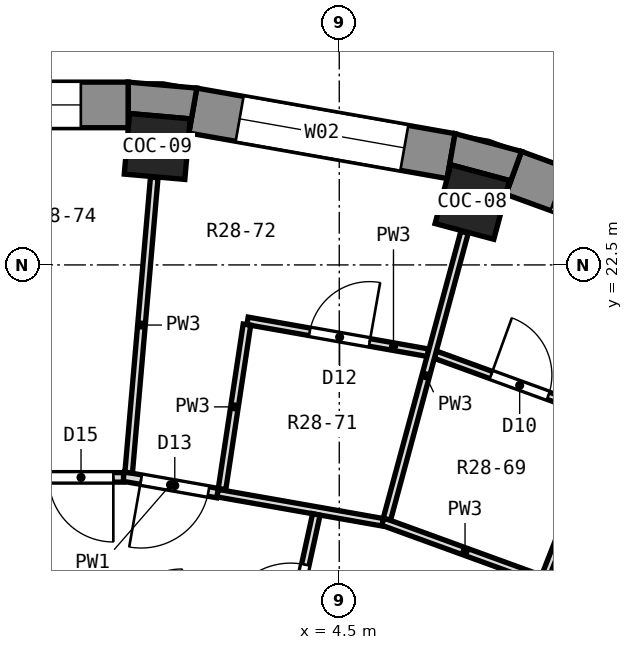
"""IFC4 building model, lengths in metres.
Left out: names, types, materials, properties, quantities, classifications, styles, units other than length and angle.
Written with IfcOpenShell. Run it as: python <this file> out.ifc"""

import sys

from ifc_helpers import new_model, si_unit, direction, frame, frame_2d, origin, origin_2d, place, context, subcontext, project, spatial, polyline, rectangle, outline, extrude, element, fill, save


model = new_model("IFC4")
c1 = context("Model", 3, precision=1e-05, world=origin(), true_north=direction((0.0, 1.0)))
c2 = subcontext(c1, "Body", "Model", "MODEL_VIEW")
j1 = project(units=[si_unit("LENGTHUNIT", "METRE"), si_unit("PLANEANGLEUNIT", "RADIAN")], contexts=[c1])
p1 = place(None, origin())
s1 = spatial("IfcSite", under=j1, at=p1, CompositionType="ELEMENT")
p2 = place(p1, origin())
s2 = spatial("IfcBuilding", under=s1, at=p2, CompositionType="ELEMENT")
p3 = place(p2, frame((0.0, 0.0, 190.5)))
s3 = spatial("IfcBuildingStorey", under=s2, at=p3, CompositionType="ELEMENT", Elevation=190.5)
for number, where, z_axis, x_axis in (
    (1, (6.25, 23.327, 0.0), (0.0, 0.0, 1.0), (0.259, 0.966, 0.0)),
    (2, (2.105, 24.058, 0.0), (0.0, 0.0, 1.0), (0.087, 0.996, 0.0)),
):
    element("IfcColumn", number, at=place(p3, frame(where, z_axis=z_axis, x_axis=x_axis)), inside=s3, PredefinedType="COLUMN", context=c2, shape_type="SweptSolid", body=[
        extrude(rectangle(XDim=0.8, YDim=0.8, at=origin_2d()), origin(), (0.0, 0.0, 1.0), 3.3),
    ])
p4 = place(p3, frame((10.036, 22.531, 0.0), z_axis=(0.0, 0.0, 1.0), x_axis=(-0.93968799822, 0.342032843455, 0.0)))
e3 = element("IfcWall", 3, at=p4, inside=s3, PredefinedType="SOLIDWALL", context=c2, shape_type="SweptSolid", body=[
    extrude(rectangle(XDim=3.45, YDim=0.6, at=frame_2d((1.725, 0.0))), origin(), (0.0, 0.0, 1.0), 2.85),
])
p5 = place(p4, frame((0.625, 0.0, 0.9)))
e4 = element("IfcOpeningElement", 4, at=p5, cuts=e3, PredefinedType="OPENING", context=c2, shape_type="SweptSolid", body=[
    extrude(rectangle(XDim=2.2, YDim=1.8, at=frame_2d((1.1, 0.9))), frame((0.0, 0.312, 0.0), z_axis=(0.0, -1.0, 0.0), x_axis=(1.0, 0.0, 0.0)), (0.0, 0.0, 1.0), 0.624),
])
p6 = place(p3, frame((5.971, 23.932, 0.0), z_axis=(0.0, 0.0, 1.0), x_axis=(-0.984814892183, 0.173607684551, 0.0)))
e5 = element("IfcWall", 5, at=p6, inside=s3, PredefinedType="SOLIDWALL", context=c2, shape_type="SweptSolid", body=[
    extrude(rectangle(XDim=3.45, YDim=0.6, at=frame_2d((1.725, 0.0))), origin(), (0.0, 0.0, 1.0), 2.85),
])
p7 = place(p6, frame((0.625, 0.0, 0.9)))
e6 = element("IfcOpeningElement", 6, at=p7, cuts=e5, PredefinedType="OPENING", context=c2, shape_type="SweptSolid", body=[
    extrude(rectangle(XDim=2.2, YDim=1.8, at=frame_2d((1.1, 0.9))), frame((0.0, 0.312, 0.0), z_axis=(0.0, -1.0, 0.0), x_axis=(1.0, 0.0, 0.0)), (0.0, 0.0, 1.0), 0.624),
])
p8 = place(p3, frame((1.725, 24.605, 0.0), z_axis=(0.0, 0.0, 1.0), x_axis=(-1.0, 0.0, 0.0)))
e7 = element("IfcWall", 7, at=p8, inside=s3, PredefinedType="SOLIDWALL", context=c2, shape_type="SweptSolid", body=[
    extrude(rectangle(XDim=3.45, YDim=0.6, at=frame_2d((1.725, 0.0))), origin(), (0.0, 0.0, 1.0), 2.85),
])
p9 = place(p8, frame((0.625, 0.0, 0.9)))
e8 = element("IfcOpeningElement", 8, at=p9, cuts=e7, PredefinedType="OPENING", context=c2, shape_type="SweptSolid", body=[
    extrude(rectangle(XDim=2.2, YDim=1.8, at=frame_2d((1.1, 0.9))), frame((0.0, 0.312, 0.0), z_axis=(0.0, -1.0, 0.0), x_axis=(1.0, 0.0, 0.0)), (0.0, 0.0, 1.0), 0.624),
])
p10 = place(p3, origin())
e9 = element("IfcWall", 9, at=p10, inside=s3, PredefinedType="SOLIDWALL", context=c2, shape_type="SweptSolid", body=[
    extrude(outline(polyline([(6.023, 24.227), (5.919, 23.636), (5.968, 23.817), (6.74, 23.61), (6.692, 23.429), (6.897, 23.993), (6.023, 24.227)])), origin(), (0.0, 0.0, 1.0), 2.85),
])
p11 = place(p3, origin())
e10 = element("IfcWall", 10, at=p11, inside=s3, PredefinedType="SOLIDWALL", context=c2, shape_type="SweptSolid", body=[
    extrude(outline(polyline([(2.626, 24.826), (1.725, 24.905), (1.725, 24.305), (1.741, 24.491), (2.538, 24.422), (2.522, 24.235), (2.626, 24.826)])), origin(), (0.0, 0.0, 1.0), 2.85),
])
p12 = place(p3, frame((5.071, 19.123, 0.0), z_axis=(0.0, 0.0, 1.0), x_axis=(0.939734670151, -0.34190459154, 0.0)))
e11 = element("IfcWall", 11, at=p12, inside=s3, PredefinedType="PARTITIONING", context=c2, shape_type="SweptSolid", body=[
    extrude(rectangle(XDim=2.306, YDim=0.1, at=frame_2d((1.153, 0.0))), origin(), (0.0, 0.0, 1.0), 2.85),
])
p13 = place(p3, frame((5.764, 21.319, 0.0), z_axis=(0.0, 0.0, 1.0), x_axis=(0.939672176826, -0.342076307422, 0.0)))
e12 = element("IfcWall", 12, at=p13, inside=s3, PredefinedType="PARTITIONING", context=c2, shape_type="SweptSolid", body=[
    extrude(rectangle(XDim=2.412, YDim=0.1, at=frame_2d((1.206, 0.0))), origin(), (0.0, 0.0, 1.0), 2.85),
])
p14 = place(p13, frame((0.781, 0.0, 0.0)))
e13 = element("IfcOpeningElement", 13, at=p14, cuts=e12, PredefinedType="OPENING", context=c2, shape_type="SweptSolid", body=[
    extrude(rectangle(XDim=0.8, YDim=2.1, at=frame_2d((0.4, 1.05))), frame((0.0, 0.062, 0.0), z_axis=(0.0, -1.0, 0.0), x_axis=(1.0, 0.0, 0.0)), (0.0, 0.0, 1.0), 0.124),
])
p15 = place(p3, frame((2.899, 19.498, 0.0), z_axis=(0.0, 0.0, 1.0), x_axis=(0.984790246942, -0.173747430277, 0.0)))
e14 = element("IfcWall", 14, at=p15, inside=s3, PredefinedType="PARTITIONING", context=c2, shape_type="SweptSolid", body=[
    extrude(rectangle(XDim=2.205, YDim=0.1, at=frame_2d((1.102, 0.0))), origin(), (0.0, 0.0, 1.0), 2.85),
])
p16 = place(p3, frame((1.662, 19.716, 0.0), z_axis=(0.0, 0.0, 1.0), x_axis=(0.984789427994, -0.173752071961, 0.0)))
e15 = element("IfcWall", 15, at=p16, inside=s3, PredefinedType="PARTITIONING", context=c2, shape_type="SweptSolid", body=[
    extrude(rectangle(XDim=1.256, YDim=0.125, at=frame_2d((0.628, 0.0))), origin(), (0.0, 0.0, 1.0), 2.85),
])
p17 = place(p16, frame((0.235, 0.0, 0.0)))
e16 = element("IfcOpeningElement", 16, at=p17, cuts=e15, PredefinedType="OPENING", context=c2, shape_type="SweptSolid", body=[
    extrude(rectangle(XDim=0.9, YDim=2.1, at=frame_2d((0.45, 1.05))), frame((0.0, 0.074, 0.0), z_axis=(0.0, -1.0, 0.0), x_axis=(1.0, 0.0, 0.0)), (0.0, 0.0, 1.0), 0.149),
])
p18 = place(p3, frame((3.293, 21.764, 0.0), z_axis=(0.0, 0.0, 1.0), x_axis=(0.984775404062, -0.173831537861, 0.0)))
e17 = element("IfcWall", 17, at=p18, inside=s3, PredefinedType="PARTITIONING", context=c2, shape_type="SweptSolid", body=[
    extrude(rectangle(XDim=2.411, YDim=0.1, at=frame_2d((1.206, 0.0))), origin(), (0.0, 0.0, 1.0), 2.85),
])
p19 = place(p18, frame((0.831, 0.0, 0.0)))
e18 = element("IfcOpeningElement", 18, at=p19, cuts=e17, PredefinedType="OPENING", context=c2, shape_type="SweptSolid", body=[
    extrude(rectangle(XDim=0.8, YDim=2.1, at=frame_2d((0.4, 1.05))), frame((0.0, 0.062, 0.0), z_axis=(0.0, -1.0, 0.0), x_axis=(1.0, 0.0, 0.0)), (0.0, 0.0, 1.0), 0.124),
])
p20 = place(p3, frame((0.531, 19.705, 0.0), z_axis=(0.0, 0.0, 1.0), x_axis=(1.0, 0.0, 0.0)))
e19 = element("IfcWall", 19, at=p20, inside=s3, PredefinedType="PARTITIONING", context=c2, shape_type="SweptSolid", body=[
    extrude(rectangle(XDim=1.131, YDim=0.125, at=frame_2d((0.565, 0.0))), origin(), (0.0, 0.0, 1.0), 2.85),
])
p21 = place(p20, frame((0.146, 0.0, 0.0)))
e20 = element("IfcOpeningElement", 20, at=p21, cuts=e19, PredefinedType="OPENING", context=c2, shape_type="SweptSolid", body=[
    extrude(rectangle(XDim=0.85, YDim=2.1, at=frame_2d((0.425, 1.05))), frame((0.0, 0.074, 0.0), z_axis=(0.0, -1.0, 0.0), x_axis=(1.0, 0.0, 0.0)), (0.0, 0.0, 1.0), 0.149),
])
p22 = place(p3, frame((7.214, 18.41, 0.0), z_axis=(0.0, 0.0, 1.0), x_axis=(0.364647558209, 0.931145616052, 0.0)))
e21 = element("IfcWall", 21, at=p22, inside=s3, PredefinedType="PARTITIONING", context=c2, shape_type="SweptSolid", body=[
    extrude(rectangle(XDim=2.188, YDim=0.1, at=frame_2d((1.094, 0.0))), origin(), (0.0, 0.0, 1.0), 2.85),
])
p23 = place(p3, frame((5.127, 19.156, 0.0), z_axis=(0.0, 0.0, 1.0), x_axis=(0.261236113371, 0.965274931339, 0.0)))
e22 = element("IfcWall", 22, at=p23, inside=s3, PredefinedType="PARTITIONING", context=c2, shape_type="SweptSolid", body=[
    extrude(rectangle(XDim=3.91, YDim=0.1, at=frame_2d((1.955, 0.0))), origin(), (0.0, 0.0, 1.0), 2.85),
])
p24 = place(p3, frame((3.421, 15.661, 0.0), z_axis=(0.0, 0.0, 1.0), x_axis=(0.213434819618, 0.976957306014, 0.0)))
e23 = element("IfcWall", 23, at=p24, inside=s3, PredefinedType="PARTITIONING", context=c2, shape_type="SweptSolid", body=[
    extrude(rectangle(XDim=3.64, YDim=0.1, at=frame_2d((1.82, 0.0))), origin(), (0.0, 0.0, 1.0), 2.85),
])
p25 = place(p24, frame((2.064, 0.0, 0.0)))
e24 = element("IfcOpeningElement", 24, at=p25, cuts=e23, PredefinedType="OPENING", context=c2, shape_type="SweptSolid", body=[
    extrude(rectangle(XDim=0.9, YDim=2.1, at=frame_2d((0.45, 1.05))), frame((0.0, 0.062, 0.0), z_axis=(0.0, -1.0, 0.0), x_axis=(1.0, 0.0, 0.0)), (0.0, 0.0, 1.0), 0.124),
])
p26 = place(p3, frame((2.957, 19.551, 0.0), z_axis=(0.0, 0.0, 1.0), x_axis=(0.149927646316, 0.988696971205, 0.0)))
e25 = element("IfcWall", 25, at=p26, inside=s3, PredefinedType="PARTITIONING", context=c2, shape_type="SweptSolid", body=[
    extrude(rectangle(XDim=2.188, YDim=0.1, at=frame_2d((1.094, 0.0))), origin(), (0.0, 0.0, 1.0), 2.85),
])
p27 = place(p3, frame((1.729, 19.767, 0.0), z_axis=(0.0, 0.0, 1.0), x_axis=(0.086389019771, 0.996261480367, 0.0)))
e26 = element("IfcWall", 26, at=p27, inside=s3, PredefinedType="PARTITIONING", context=c2, shape_type="SweptSolid", body=[
    extrude(rectangle(XDim=3.897, YDim=0.1, at=frame_2d((1.949, 0.0))), origin(), (0.0, 0.0, 1.0), 2.85),
])
p28 = place(p7, origin())
e27 = element("IfcWindow", 27, at=p28, inside=s3, PartitioningType="SINGLE_PANEL", PredefinedType="WINDOW", context=c2, shape_type="SweptSolid", body=[
    extrude(rectangle(XDim=2.2, YDim=1.8, at=frame_2d((1.1, 0.9))), frame((0.0, 0.18, 0.0), z_axis=(0.0, -1.0, 0.0), x_axis=(1.0, 0.0, 0.0)), (0.0, 0.0, 1.0), 0.06),
])
fill(e6, e27)
p29 = place(p9, origin())
e28 = element("IfcWindow", 28, at=p29, inside=s3, PartitioningType="SINGLE_PANEL", PredefinedType="WINDOW", context=c2, shape_type="SweptSolid", body=[
    extrude(rectangle(XDim=2.2, YDim=1.8, at=frame_2d((1.1, 0.9))), frame((0.0, 0.18, 0.0), z_axis=(0.0, -1.0, 0.0), x_axis=(1.0, 0.0, 0.0)), (0.0, 0.0, 1.0), 0.06),
])
fill(e8, e28)
p30 = place(p14, origin())
e29 = element("IfcDoor", 29, at=p30, inside=s3, OperationType="SINGLE_SWING_LEFT", PredefinedType="DOOR", context=c2, shape_type="SweptSolid", body=[
    extrude(rectangle(XDim=0.8, YDim=2.1, at=frame_2d((0.4, 1.05))), frame((0.0, 0.025, 0.0), z_axis=(0.0, -1.0, 0.0), x_axis=(1.0, 0.0, 0.0)), (0.0, 0.0, 1.0), 0.05),
])
fill(e13, e29)
p31 = place(p25, origin())
e30 = element("IfcDoor", 30, at=p31, inside=s3, OperationType="SINGLE_SWING_LEFT", PredefinedType="DOOR", context=c2, shape_type="SweptSolid", body=[
    extrude(rectangle(XDim=0.9, YDim=2.1, at=frame_2d((0.45, 1.05))), frame((0.0, 0.025, 0.0), z_axis=(0.0, -1.0, 0.0), x_axis=(1.0, 0.0, 0.0)), (0.0, 0.0, 1.0), 0.05),
])
fill(e24, e30)
p32 = place(p19, origin())
e31 = element("IfcDoor", 31, at=p32, inside=s3, OperationType="SINGLE_SWING_RIGHT", PredefinedType="DOOR", context=c2, shape_type="SweptSolid", body=[
    extrude(rectangle(XDim=0.8, YDim=2.1, at=frame_2d((0.4, 1.05))), frame((0.0, 0.025, 0.0), z_axis=(0.0, -1.0, 0.0), x_axis=(1.0, 0.0, 0.0)), (0.0, 0.0, 1.0), 0.05),
])
fill(e18, e31)
p33 = place(p17, frame((0.9, 0.0, 0.0), z_axis=(0.0, 0.0, 1.0), x_axis=(-1.0, 0.0, 0.0)))
e32 = element("IfcDoor", 32, at=p33, inside=s3, OperationType="SINGLE_SWING_RIGHT", PredefinedType="DOOR", context=c2, shape_type="SweptSolid", body=[
    extrude(rectangle(XDim=0.9, YDim=2.1, at=frame_2d((0.45, 1.05))), frame((0.0, 0.025, 0.0), z_axis=(0.0, -1.0, 0.0), x_axis=(1.0, 0.0, 0.0)), (0.0, 0.0, 1.0), 0.05),
])
fill(e16, e32)
p34 = place(p21, frame((0.85, 0.0, 0.0), z_axis=(0.0, 0.0, 1.0), x_axis=(-1.0, 0.0, 0.0)))
e33 = element("IfcDoor", 33, at=p34, inside=s3, OperationType="SINGLE_SWING_LEFT", PredefinedType="DOOR", context=c2, shape_type="SweptSolid", body=[
    extrude(rectangle(XDim=0.85, YDim=2.1, at=frame_2d((0.425, 1.05))), frame((0.0, 0.025, 0.0), z_axis=(0.0, -1.0, 0.0), x_axis=(1.0, 0.0, 0.0)), (0.0, 0.0, 1.0), 0.05),
])
fill(e20, e33)
save(model, sys.argv[1])
